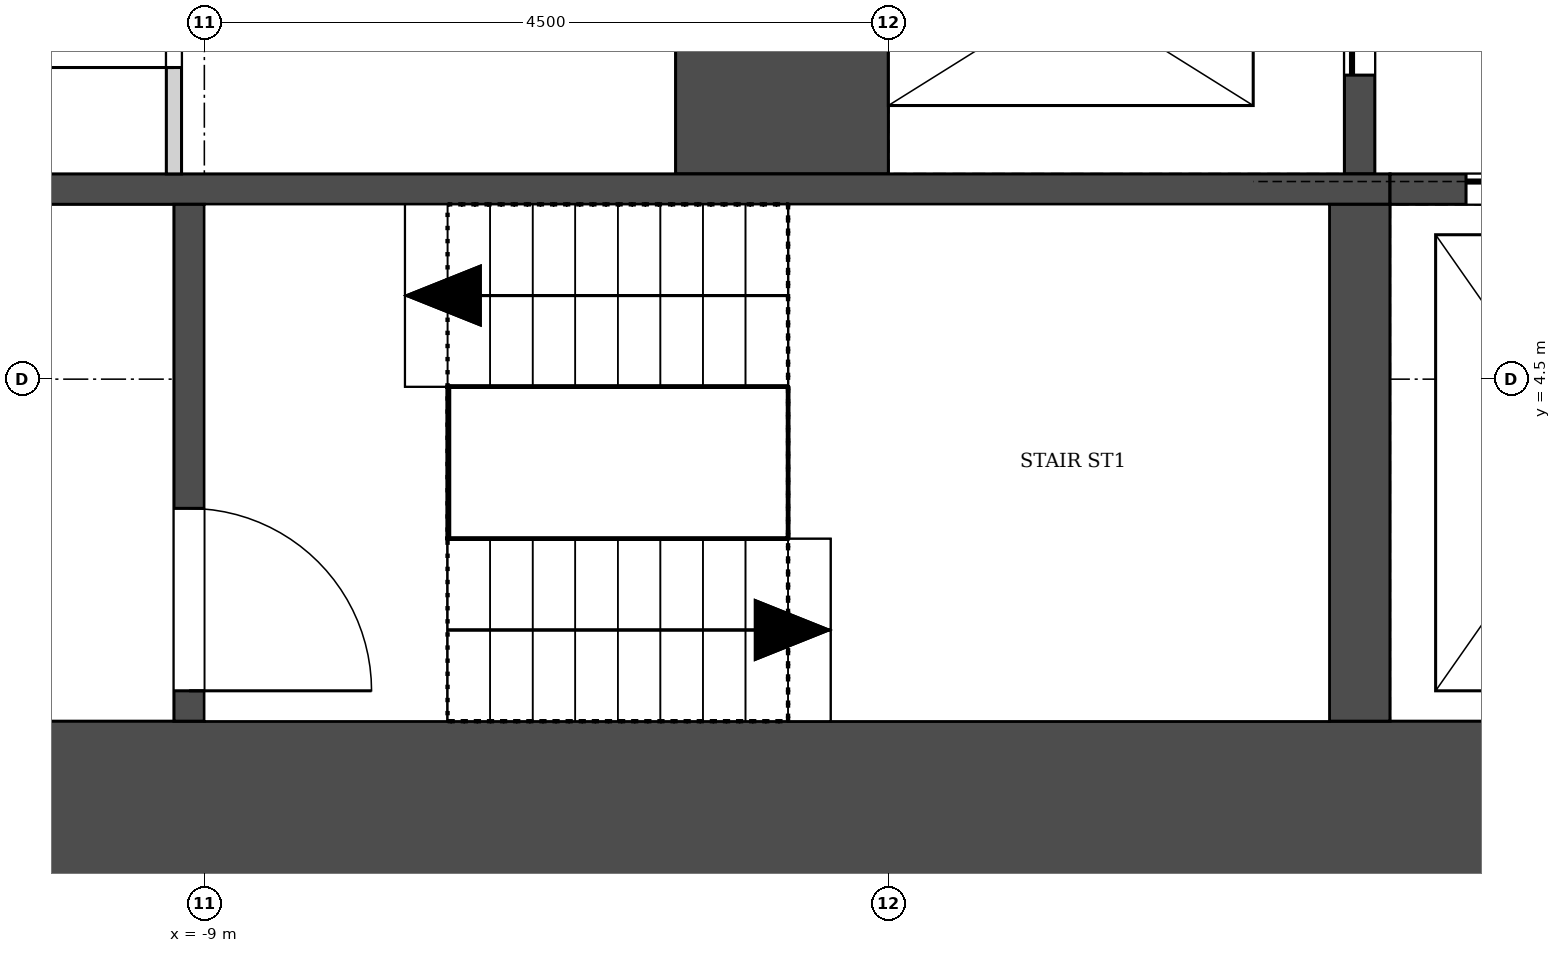
"""IFC4 building model, lengths in metres.
Left out: names, types, materials, properties, quantities, classifications, styles, units other than length and angle.
Written with IfcOpenShell. Run it as: python <this file> out.ifc"""

import sys

from ifc_helpers import new_model, si_unit, direction, frame, frame_2d, origin, place, context, subcontext, project, spatial, rectangle, extrude, element, fill, save


model = new_model("IFC4")
c1 = context("Model", 3, precision=1e-05, world=origin(), true_north=direction((0.0, 1.0)))
c2 = subcontext(c1, "Body", "Model", "MODEL_VIEW")
j1 = project(units=[si_unit("LENGTHUNIT", "METRE"), si_unit("PLANEANGLEUNIT", "RADIAN")], contexts=[c1])
p1 = place(None, origin())
s1 = spatial("IfcSite", under=j1, at=p1, CompositionType="ELEMENT")
p2 = place(p1, origin())
s2 = spatial("IfcBuilding", under=s1, at=p2, CompositionType="ELEMENT")
p3 = place(p2, frame((0.0, 0.0, 14.0)))
s3 = spatial("IfcBuildingStorey", under=s2, at=p3, CompositionType="ELEMENT", Elevation=14.0)
p4 = place(p3, frame((-14.0, 1.55, 0.0), z_axis=(0.0, 0.0, 1.0), x_axis=(1.0, 0.0, 0.0)))
e1 = element("IfcWall", 1, at=p4, inside=s3, PredefinedType="SHEAR", context=c2, shape_type="SweptSolid", body=[
    extrude(rectangle(XDim=28.0, YDim=1.4, at=frame_2d((14.0, 0.0))), origin(), (0.0, 0.0, 1.0), 6.0),
])
p5 = place(p3, frame((-1.4, 5.85, -0.3), z_axis=(0.0, 0.0, 1.0), x_axis=(0.0, 1.0, 0.0)))
e2 = element("IfcWall", 2, at=p5, inside=s3, PredefinedType="SOLIDWALL", context=c2, shape_type="SweptSolid", body=[
    extrude(rectangle(XDim=11.75, YDim=0.2, at=frame_2d((5.875, 0.0))), origin(), (0.0, 0.0, 1.0), 6.0),
])
p6 = place(p5, frame((3.2, 0.0, 0.3)))
e3 = element("IfcOpeningElement", 3, at=p6, cuts=e2, PredefinedType="OPENING", context=c2, shape_type="SweptSolid", body=[
    extrude(rectangle(XDim=1.2, YDim=2.1, at=frame_2d((0.6, 1.05))), frame((0.0, 0.11, 0.0), z_axis=(0.0, -1.0, 0.0), x_axis=(1.0, 0.0, 0.0)), (0.0, 0.0, 1.0), 0.22),
])
p7 = place(p5, frame((0.65, 0.0, 0.3)))
e4 = element("IfcOpeningElement", 4, at=p7, cuts=e2, PredefinedType="OPENING", context=c2, shape_type="SweptSolid", body=[
    extrude(rectangle(XDim=1.1, YDim=2.1, at=frame_2d((0.55, 1.05))), frame((0.0, 0.11, 0.0), z_axis=(0.0, -1.0, 0.0), x_axis=(1.0, 0.0, 0.0)), (0.0, 0.0, 1.0), 0.22),
])
p8 = place(p3, frame((-5.2, 5.85, -0.3), z_axis=(0.0, 0.0, 1.0), x_axis=(0.0, 1.0, 0.0)))
e5 = element("IfcWall", 5, at=p8, inside=s3, PredefinedType="SOLIDWALL", context=c2, shape_type="SweptSolid", body=[
    extrude(rectangle(XDim=2.4, YDim=1.4, at=frame_2d((1.2, 0.0))), origin(), (0.0, 0.0, 1.0), 6.0),
])
p9 = place(p3, frame((-12.6, 5.75, -0.3), z_axis=(0.0, 0.0, 1.0), x_axis=(1.0, 0.0, 0.0)))
e6 = element("IfcWall", 6, at=p9, inside=s3, PredefinedType="SOLIDWALL", context=c2, shape_type="SweptSolid", body=[
    extrude(rectangle(XDim=11.4, YDim=0.2, at=frame_2d((5.7, 0.0))), origin(), (0.0, 0.0, 1.0), 6.0),
])
p10 = place(p3, frame((-1.2, 5.75, -0.3), z_axis=(0.0, 0.0, 1.0), x_axis=(1.0, 0.0, 0.0)))
e7 = element("IfcWall", 7, at=p10, inside=s3, PredefinedType="SOLIDWALL", context=c2, shape_type="SweptSolid", body=[
    extrude(rectangle(XDim=2.4, YDim=0.2, at=frame_2d((1.2, 0.0))), origin(), (0.0, 0.0, 1.0), 6.0),
])
p11 = place(p10, frame((0.5, 0.0, 0.3)))
e8 = element("IfcOpeningElement", 8, at=p11, cuts=e7, PredefinedType="OPENING", context=c2, shape_type="SweptSolid", body=[
    extrude(rectangle(XDim=1.4, YDim=2.1, at=frame_2d((0.7, 1.05))), frame((0.0, 0.11, 0.0), z_axis=(0.0, -1.0, 0.0), x_axis=(1.0, 0.0, 0.0)), (0.0, 0.0, 1.0), 0.22),
])
p12 = place(p3, frame((-9.1, 2.25, -0.3), z_axis=(0.0, 0.0, 1.0), x_axis=(0.0, 1.0, 0.0)))
e9 = element("IfcWall", 9, at=p12, inside=s3, PredefinedType="SOLIDWALL", context=c2, shape_type="SweptSolid", body=[
    extrude(rectangle(XDim=3.4, YDim=0.2, at=frame_2d((1.7, 0.0))), origin(), (0.0, 0.0, 1.0), 6.0),
])
p13 = place(p12, frame((0.2, 0.0, 0.3)))
e10 = element("IfcOpeningElement", 10, at=p13, cuts=e9, PredefinedType="OPENING", context=c2, shape_type="SweptSolid", body=[
    extrude(rectangle(XDim=1.2, YDim=2.1, at=frame_2d((0.6, 1.05))), frame((0.0, 0.11, 0.0), z_axis=(0.0, -1.0, 0.0), x_axis=(1.0, 0.0, 0.0)), (0.0, 0.0, 1.0), 0.22),
])
p14 = place(p3, frame((-1.4, 2.25, -0.3), z_axis=(0.0, 0.0, 1.0), x_axis=(0.0, 1.0, 0.0)))
e11 = element("IfcWall", 11, at=p14, inside=s3, PredefinedType="SOLIDWALL", context=c2, shape_type="SweptSolid", body=[
    extrude(rectangle(XDim=3.4, YDim=0.4, at=frame_2d((1.7, 0.0))), origin(), (0.0, 0.0, 1.0), 6.0),
])
p15 = place(p3, frame((-9.2, 5.85, 0.0), z_axis=(0.0, 0.0, 1.0), x_axis=(0.0, 1.0, 0.0)))
e12 = element("IfcWall", 12, at=p15, inside=s3, PredefinedType="PARTITIONING", context=c2, shape_type="SweptSolid", body=[
    extrude(rectangle(XDim=2.4, YDim=0.1, at=frame_2d((1.2, 0.0))), origin(), (0.0, 0.0, 1.0), 5.7),
])
p16 = place(p15, frame((0.7, 0.0, 0.0)))
e13 = element("IfcOpeningElement", 13, at=p16, cuts=e12, PredefinedType="OPENING", context=c2, shape_type="SweptSolid", body=[
    extrude(rectangle(XDim=0.9, YDim=2.1, at=frame_2d((0.45, 1.05))), frame((0.0, 0.06, 0.0), z_axis=(0.0, -1.0, 0.0), x_axis=(1.0, 0.0, 0.0)), (0.0, 0.0, 1.0), 0.12),
])
p17 = place(p7, origin())
e14 = element("IfcDoor", 14, at=p17, inside=s3, OperationType="SLIDING_TO_RIGHT", PredefinedType="DOOR", context=c2, shape_type="SweptSolid", body=[
    extrude(rectangle(XDim=1.1, YDim=2.1, at=frame_2d((0.55, 1.05))), frame((0.0, 0.025, 0.0), z_axis=(0.0, -1.0, 0.0), x_axis=(1.0, 0.0, 0.0)), (0.0, 0.0, 1.0), 0.05),
])
fill(e4, e14)
p18 = place(p11, origin())
e15 = element("IfcDoor", 15, at=p18, inside=s3, OperationType="SLIDING_TO_LEFT", PredefinedType="DOOR", context=c2, shape_type="SweptSolid", body=[
    extrude(rectangle(XDim=1.4, YDim=2.1, at=frame_2d((0.7, 1.05))), frame((0.0, 0.025, 0.0), z_axis=(0.0, -1.0, 0.0), x_axis=(1.0, 0.0, 0.0)), (0.0, 0.0, 1.0), 0.05),
])
fill(e8, e15)
p19 = place(p16, origin())
e16 = element("IfcDoor", 16, at=p19, inside=s3, OperationType="SINGLE_SWING_LEFT", PredefinedType="DOOR", context=c2, shape_type="SweptSolid", body=[
    extrude(rectangle(XDim=0.9, YDim=2.1, at=frame_2d((0.45, 1.05))), frame((0.0, 0.025, 0.0), z_axis=(0.0, -1.0, 0.0), x_axis=(1.0, 0.0, 0.0)), (0.0, 0.0, 1.0), 0.05),
])
fill(e13, e16)
p20 = place(p13, frame((1.2, 0.0, 0.0), z_axis=(0.0, 0.0, 1.0), x_axis=(-1.0, 0.0, 0.0)))
e17 = element("IfcDoor", 17, at=p20, inside=s3, OperationType="SINGLE_SWING_RIGHT", PredefinedType="DOOR", context=c2, shape_type="SweptSolid", body=[
    extrude(rectangle(XDim=1.2, YDim=2.1, at=frame_2d((0.6, 1.05))), frame((0.0, 0.025, 0.0), z_axis=(0.0, -1.0, 0.0), x_axis=(1.0, 0.0, 0.0)), (0.0, 0.0, 1.0), 0.05),
])
fill(e10, e17)
save(model, sys.argv[1])
